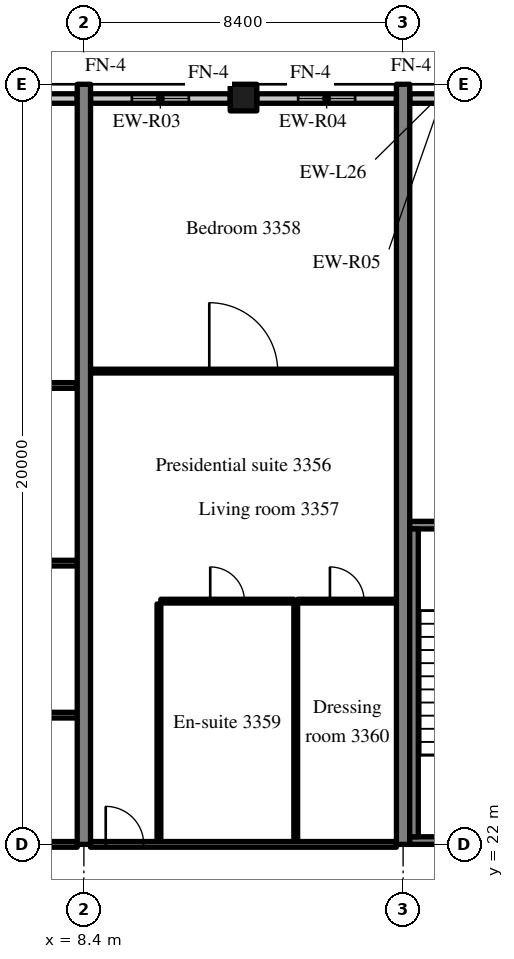
"""IFC4 building model, lengths in metres.
Left out: names, types, materials, properties, quantities, classifications, styles, units other than length and angle.
Written with IfcOpenShell. Run it as: python <this file> out.ifc"""

import sys

from ifc_helpers import new_model, si_unit, direction, frame, frame_2d, origin, origin_2d, place, context, subcontext, project, spatial, rectangle, extrude, source, transform, mapped, element, fill, save


model = new_model("IFC4")
c1 = context("Model", 3, precision=1e-05, world=origin(), true_north=direction((0.0, 1.0)))
c2 = subcontext(c1, "Body", "Model", "MODEL_VIEW")
j1 = project(units=[si_unit("LENGTHUNIT", "METRE"), si_unit("PLANEANGLEUNIT", "RADIAN")], contexts=[c1])
p1 = place(None, origin())
s1 = spatial("IfcSite", under=j1, at=p1, CompositionType="ELEMENT")
p2 = place(p1, origin())
s2 = spatial("IfcBuilding", under=s1, at=p2, CompositionType="ELEMENT")
p3 = place(p2, frame((0.0, 0.0, 137.0)))
s3 = spatial("IfcBuildingStorey", under=s2, at=p3, CompositionType="ELEMENT", Elevation=137.0)
m1 = source(origin(), c2, "Body", "SweptSolid", [
    extrude(rectangle(XDim=20.0, YDim=0.35, at=frame_2d((10.0, 0.0))), origin(), (0.0, 0.0, 1.0), 3.52),
])
for number, where, z_axis, x_axis in (
    (1, (8.4, 22.0, 0.0), (0.0, 0.0, 1.0), (0.0, 1.0, 0.0)),
    (2, (16.8, 22.0, 0.0), (0.0, 0.0, 1.0), (0.0, 1.0, 0.0)),
):
    element("IfcWall", number, at=place(p3, frame(where, z_axis=z_axis, x_axis=x_axis)), inside=s3, PredefinedType="SHEAR", context=c2, shape_type="MappedRepresentation", body=[
        mapped(m1, transform((0.0, 0.0, 0.0), scale=1.0)),
    ])
m2 = source(origin(), c2, "Body", "SweptSolid", [
    extrude(rectangle(XDim=0.7, YDim=0.7, at=origin_2d()), origin(), (0.0, 0.0, 1.0), 3.52),
])
p4 = place(p3, frame((12.6, 41.65, 0.0), z_axis=(0.0, 0.0, 1.0), x_axis=(1.0, 0.0, 0.0)))
e3 = element("IfcColumn", 3, at=p4, inside=s3, PredefinedType="COLUMN", context=c2, shape_type="MappedRepresentation", body=[
    mapped(m2, transform((0.0, 0.0, 0.0), scale=1.0)),
])
m3 = source(origin(), c2, "Body", "SweptSolid", [
    extrude(rectangle(XDim=4.07, YDim=0.25, at=frame_2d((2.035, 0.0))), origin(), (0.0, 0.0, 1.0), 2.82),
])
p5 = place(p3, frame((8.225, 41.625, 0.0), z_axis=(0.0, 0.0, 1.0), x_axis=(-1.0, 0.0, 0.0)))
e4 = element("IfcWall", 4, at=p5, inside=s3, PredefinedType="SOLIDWALL", context=c2, shape_type="MappedRepresentation", body=[
    mapped(m3, transform((0.0, 0.0, 0.0), scale=1.0)),
])
m4 = source(origin(), c2, "Body", "SweptSolid", [
    extrude(rectangle(XDim=1.5, YDim=1.5, at=frame_2d((0.75, 0.75))), frame((0.0, 0.135, 0.0), z_axis=(0.0, -1.0, 0.0), x_axis=(1.0, 0.0, 0.0)), (0.0, 0.0, 1.0), 0.27),
])
p6 = place(p5, frame((1.285, 0.0, 0.9)))
e5 = element("IfcOpeningElement", 5, at=p6, cuts=e4, PredefinedType="OPENING", context=c2, shape_type="MappedRepresentation", body=[
    mapped(m4, transform((0.0, 0.0, 0.0), scale=1.0)),
])
m5 = source(origin(), c2, "Body", "SweptSolid", [
    extrude(rectangle(XDim=3.675, YDim=0.25, at=frame_2d((1.837, 0.0))), origin(), (0.0, 0.0, 1.0), 2.82),
])
p7 = place(p3, frame((12.25, 41.625, 0.0), z_axis=(0.0, 0.0, 1.0), x_axis=(-1.0, 0.0, 0.0)))
e6 = element("IfcWall", 6, at=p7, inside=s3, PredefinedType="SOLIDWALL", context=c2, shape_type="MappedRepresentation", body=[
    mapped(m5, transform((0.0, 0.0, 0.0), scale=1.0)),
])
p8 = place(p7, frame((1.087, 0.0, 0.9)))
e7 = element("IfcOpeningElement", 7, at=p8, cuts=e6, PredefinedType="OPENING", context=c2, shape_type="MappedRepresentation", body=[
    mapped(m4, transform((0.0, 0.0, 0.0), scale=1.0)),
])
p9 = place(p3, frame((16.625, 41.625, 0.0), z_axis=(0.0, 0.0, 1.0), x_axis=(-1.0, 0.0, 0.0)))
e8 = element("IfcWall", 8, at=p9, inside=s3, PredefinedType="SOLIDWALL", context=c2, shape_type="MappedRepresentation", body=[
    mapped(m5, transform((0.0, 0.0, 0.0), scale=1.0)),
])
p10 = place(p9, frame((1.087, 0.0, 0.9)))
e9 = element("IfcOpeningElement", 9, at=p10, cuts=e8, PredefinedType="OPENING", context=c2, shape_type="MappedRepresentation", body=[
    mapped(m4, transform((0.0, 0.0, 0.0), scale=1.0)),
])
m6 = source(origin(), c2, "Body", "SweptSolid", [
    extrude(rectangle(XDim=1.683, YDim=0.25, at=frame_2d((0.841, 0.0))), origin(), (0.0, 0.0, 1.0), 2.82),
])
p11 = place(p3, frame((18.658, 41.625, 0.0), z_axis=(0.0, 0.0, 1.0), x_axis=(-1.0, 0.0, 0.0)))
e10 = element("IfcWall", 10, at=p11, inside=s3, PredefinedType="SOLIDWALL", context=c2, shape_type="MappedRepresentation", body=[
    mapped(m6, transform((0.0, 0.0, 0.0), scale=1.0)),
])
m7 = source(origin(), c2, "Body", "SweptSolid", [
    extrude(rectangle(XDim=8.225, YDim=0.2, at=frame_2d((4.112, 0.0))), origin(), (0.0, 0.0, 1.0), 3.52),
])
p12 = place(p3, frame((16.975, 22.1, 0.0), z_axis=(0.0, 0.0, 1.0), x_axis=(1.0, 0.0, 0.0)))
e11 = element("IfcWall", 11, at=p12, inside=s3, PredefinedType="SOLIDWALL", context=c2, shape_type="MappedRepresentation", body=[
    mapped(m7, transform((0.0, 0.0, 0.0), scale=1.0)),
])
m8 = source(origin(), c2, "Body", "SweptSolid", [
    extrude(rectangle(XDim=1.2, YDim=2.1, at=frame_2d((0.6, 1.05))), frame((0.0, 0.11, 0.0), z_axis=(0.0, -1.0, 0.0), x_axis=(1.0, 0.0, 0.0)), (0.0, 0.0, 1.0), 0.22),
])
p13 = place(p12, frame((6.025, 0.0, 0.0)))
e12 = element("IfcOpeningElement", 12, at=p13, cuts=e11, PredefinedType="OPENING", context=c2, shape_type="MappedRepresentation", body=[
    mapped(m8, transform((0.0, 0.0, 0.0), scale=1.0)),
])
p14 = place(p3, frame((16.975, 30.4, 0.0), z_axis=(0.0, 0.0, 1.0), x_axis=(1.0, 0.0, 0.0)))
e13 = element("IfcWall", 13, at=p14, inside=s3, PredefinedType="SOLIDWALL", context=c2, shape_type="MappedRepresentation", body=[
    mapped(m7, transform((0.0, 0.0, 0.0), scale=1.0)),
])
m9 = source(origin(), c2, "Body", "SweptSolid", [
    extrude(rectangle(XDim=1.0, YDim=2.1, at=frame_2d((0.5, 1.05))), frame((0.0, 0.11, 0.0), z_axis=(0.0, -1.0, 0.0), x_axis=(1.0, 0.0, 0.0)), (0.0, 0.0, 1.0), 0.22),
])
p15 = place(p14, frame((6.125, 0.0, 0.0)))
e14 = element("IfcOpeningElement", 14, at=p15, cuts=e13, PredefinedType="OPENING", context=c2, shape_type="MappedRepresentation", body=[
    mapped(m9, transform((0.0, 0.0, 0.0), scale=1.0)),
])
m10 = source(origin(), c2, "Body", "SweptSolid", [
    extrude(rectangle(XDim=8.1, YDim=0.225, at=frame_2d((4.05, 0.0))), origin(), (0.0, 0.0, 1.0), 3.52),
])
p16 = place(p3, frame((17.087, 22.2, 0.0), z_axis=(0.0, 0.0, 1.0), x_axis=(0.0, 1.0, 0.0)))
e15 = element("IfcWall", 15, at=p16, inside=s3, PredefinedType="SOLIDWALL", context=c2, shape_type="MappedRepresentation", body=[
    mapped(m10, transform((0.0, 0.0, 0.0), scale=1.0)),
])
m11 = source(origin(), c2, "Body", "SweptSolid", [
    extrude(rectangle(XDim=5.325, YDim=0.15, at=frame_2d((2.663, 0.0))), origin(), (0.0, 0.0, 1.0), 2.82),
])
p17 = place(p3, frame((2.9, 22.0, 0.0), z_axis=(0.0, 0.0, 1.0), x_axis=(1.0, 0.0, 0.0)))
e16 = element("IfcWall", 16, at=p17, inside=s3, PredefinedType="PARTITIONING", context=c2, shape_type="MappedRepresentation", body=[
    mapped(m11, transform((0.0, 0.0, 0.0), scale=1.0)),
])
m12 = source(origin(), c2, "Body", "SweptSolid", [
    extrude(rectangle(XDim=5.325, YDim=0.15, at=frame_2d((2.663, 0.0))), origin(), (0.0, 0.0, 1.0), 3.52),
])
for number, where, z_axis, x_axis in (
    (17, (2.9, 25.4, 0.0), (0.0, 0.0, 1.0), (1.0, 0.0, 0.0)),
    (18, (2.9, 29.4, 0.0), (0.0, 0.0, 1.0), (1.0, 0.0, 0.0)),
):
    element("IfcWall", number, at=place(p3, frame(where, z_axis=z_axis, x_axis=x_axis)), inside=s3, PredefinedType="PARTITIONING", context=c2, shape_type="MappedRepresentation", body=[
        mapped(m12, transform((0.0, 0.0, 0.0), scale=1.0)),
    ])
m13 = source(origin(), c2, "Body", "SweptSolid", [
    extrude(rectangle(XDim=7.875, YDim=0.15, at=frame_2d((3.938, 0.0))), origin(), (0.0, 0.0, 1.0), 3.52),
])
p18 = place(p3, frame((0.35, 34.075, 0.0), z_axis=(0.0, 0.0, 1.0), x_axis=(1.0, 0.0, 0.0)))
e19 = element("IfcWall", 19, at=p18, inside=s3, PredefinedType="PARTITIONING", context=c2, shape_type="MappedRepresentation", body=[
    mapped(m13, transform((0.0, 0.0, 0.0), scale=1.0)),
])
m14 = source(origin(), c2, "Body", "SweptSolid", [
    extrude(rectangle(XDim=1.0, YDim=2.1, at=frame_2d((0.5, 1.05))), frame((0.0, 0.085, 0.0), z_axis=(0.0, -1.0, 0.0), x_axis=(1.0, 0.0, 0.0)), (0.0, 0.0, 1.0), 0.17),
])
p19 = place(p18, frame((0.7, 0.0, 0.0)))
e20 = element("IfcOpeningElement", 20, at=p19, cuts=e19, PredefinedType="OPENING", context=c2, shape_type="MappedRepresentation", body=[
    mapped(m14, transform((0.0, 0.0, 0.0), scale=1.0)),
])
m15 = source(origin(), c2, "Body", "SweptSolid", [
    extrude(rectangle(XDim=6.25, YDim=0.1, at=frame_2d((3.125, 0.0))), origin(), (0.0, 0.0, 1.0), 3.52),
])
for number, where, z_axis, x_axis in (
    (21, (10.375, 22.075, 0.0), (0.0, 0.0, 1.0), (0.0, 1.0, 0.0)),
    (22, (13.975, 22.075, 0.0), (0.0, 0.0, 1.0), (0.0, 1.0, 0.0)),
):
    element("IfcWall", number, at=place(p3, frame(where, z_axis=z_axis, x_axis=x_axis)), inside=s3, PredefinedType="PARTITIONING", context=c2, shape_type="MappedRepresentation", body=[
        mapped(m15, transform((0.0, 0.0, 0.0), scale=1.0)),
    ])
m16 = source(origin(), c2, "Body", "SweptSolid", [
    extrude(rectangle(XDim=3.5, YDim=0.1, at=frame_2d((1.75, 0.0))), origin(), (0.0, 0.0, 1.0), 3.52),
])
p20 = place(p3, frame((10.425, 28.4, 0.0), z_axis=(0.0, 0.0, 1.0), x_axis=(1.0, 0.0, 0.0)))
e23 = element("IfcWall", 23, at=p20, inside=s3, PredefinedType="PARTITIONING", context=c2, shape_type="MappedRepresentation", body=[
    mapped(m16, transform((0.0, 0.0, 0.0), scale=1.0)),
])
m17 = source(origin(), c2, "Body", "SweptSolid", [
    extrude(rectangle(XDim=0.9, YDim=2.1, at=frame_2d((0.45, 1.05))), frame((0.0, 0.06, 0.0), z_axis=(0.0, -1.0, 0.0), x_axis=(1.0, 0.0, 0.0)), (0.0, 0.0, 1.0), 0.12),
])
p21 = place(p20, frame((1.3, 0.0, 0.0)))
e24 = element("IfcOpeningElement", 24, at=p21, cuts=e23, PredefinedType="OPENING", context=c2, shape_type="MappedRepresentation", body=[
    mapped(m17, transform((0.0, 0.0, 0.0), scale=1.0)),
])
m18 = source(origin(), c2, "Body", "SweptSolid", [
    extrude(rectangle(XDim=2.6, YDim=0.1, at=frame_2d((1.3, 0.0))), origin(), (0.0, 0.0, 1.0), 3.52),
])
p22 = place(p3, frame((14.025, 28.4, 0.0), z_axis=(0.0, 0.0, 1.0), x_axis=(1.0, 0.0, 0.0)))
e25 = element("IfcWall", 25, at=p22, inside=s3, PredefinedType="PARTITIONING", context=c2, shape_type="MappedRepresentation", body=[
    mapped(m18, transform((0.0, 0.0, 0.0), scale=1.0)),
])
p23 = place(p22, frame((0.85, 0.0, 0.0)))
e26 = element("IfcOpeningElement", 26, at=p23, cuts=e25, PredefinedType="OPENING", context=c2, shape_type="MappedRepresentation", body=[
    mapped(m17, transform((0.0, 0.0, 0.0), scale=1.0)),
])
m19 = source(origin(), c2, "Body", "SweptSolid", [
    extrude(rectangle(XDim=8.05, YDim=0.1, at=frame_2d((4.025, 0.0))), origin(), (0.0, 0.0, 1.0), 3.52),
])
p24 = place(p3, frame((8.575, 34.453, 0.0), z_axis=(0.0, 0.0, 1.0), x_axis=(1.0, 0.0, 0.0)))
e27 = element("IfcWall", 27, at=p24, inside=s3, PredefinedType="PARTITIONING", context=c2, shape_type="MappedRepresentation", body=[
    mapped(m19, transform((0.0, 0.0, 0.0), scale=1.0)),
])
m20 = source(origin(), c2, "Body", "SweptSolid", [
    extrude(rectangle(XDim=1.8, YDim=2.1, at=frame_2d((0.9, 1.05))), frame((0.0, 0.06, 0.0), z_axis=(0.0, -1.0, 0.0), x_axis=(1.0, 0.0, 0.0)), (0.0, 0.0, 1.0), 0.12),
])
p25 = place(p24, frame((3.125, 0.0, 0.0)))
e28 = element("IfcOpeningElement", 28, at=p25, cuts=e27, PredefinedType="OPENING", context=c2, shape_type="MappedRepresentation", body=[
    mapped(m20, transform((0.0, 0.0, 0.0), scale=1.0)),
])
m21 = source(origin(), c2, "Body", "SweptSolid", [
    extrude(rectangle(XDim=8.05, YDim=0.15, at=frame_2d((4.025, 0.0))), origin(), (0.0, 0.0, 1.0), 2.82),
])
p26 = place(p3, frame((8.575, 22.0, 0.0), z_axis=(0.0, 0.0, 1.0), x_axis=(1.0, 0.0, 0.0)))
e29 = element("IfcWall", 29, at=p26, inside=s3, PredefinedType="PARTITIONING", context=c2, shape_type="MappedRepresentation", body=[
    mapped(m21, transform((0.0, 0.0, 0.0), scale=1.0)),
])
p27 = place(p26, frame((0.4, 0.0, 0.0)))
e30 = element("IfcOpeningElement", 30, at=p27, cuts=e29, PredefinedType="OPENING", context=c2, shape_type="MappedRepresentation", body=[
    mapped(m14, transform((0.0, 0.0, 0.0), scale=1.0)),
])
m22 = source(origin(), c2, "Body", "SweptSolid", [
    extrude(rectangle(XDim=1.5, YDim=1.5, at=frame_2d((0.75, 0.75))), frame((0.0, 0.03, 0.0), z_axis=(0.0, -1.0, 0.0), x_axis=(1.0, 0.0, 0.0)), (0.0, 0.0, 1.0), 0.06),
])
p28 = place(p8, origin())
e31 = element("IfcWindow", 31, at=p28, inside=s3, PartitioningType="SINGLE_PANEL", PredefinedType="WINDOW", context=c2, shape_type="MappedRepresentation", body=[
    mapped(m22, transform((0.0, 0.0, 0.0), scale=1.0)),
])
fill(e7, e31)
p29 = place(p10, origin())
e32 = element("IfcWindow", 32, at=p29, inside=s3, PartitioningType="SINGLE_PANEL", PredefinedType="WINDOW", context=c2, shape_type="MappedRepresentation", body=[
    mapped(m22, transform((0.0, 0.0, 0.0), scale=1.0)),
])
fill(e9, e32)
m23 = source(origin(), c2, "Body", "SweptSolid", [
    extrude(rectangle(XDim=0.9, YDim=2.1, at=frame_2d((0.45, 1.05))), frame((0.0, 0.025, 0.0), z_axis=(0.0, -1.0, 0.0), x_axis=(1.0, 0.0, 0.0)), (0.0, 0.0, 1.0), 0.05),
])
p30 = place(p21, origin())
e33 = element("IfcDoor", 33, at=p30, inside=s3, OperationType="SINGLE_SWING_LEFT", PredefinedType="DOOR", context=c2, shape_type="MappedRepresentation", body=[
    mapped(m23, transform((0.0, 0.0, 0.0), scale=1.0)),
])
fill(e24, e33)
p31 = place(p23, origin())
e34 = element("IfcDoor", 34, at=p31, inside=s3, OperationType="SINGLE_SWING_LEFT", PredefinedType="DOOR", context=c2, shape_type="MappedRepresentation", body=[
    mapped(m23, transform((0.0, 0.0, 0.0), scale=1.0)),
])
fill(e26, e34)
m24 = source(origin(), c2, "Body", "SweptSolid", [
    extrude(rectangle(XDim=1.8, YDim=2.1, at=frame_2d((0.9, 1.05))), frame((0.0, 0.025, 0.0), z_axis=(0.0, -1.0, 0.0), x_axis=(1.0, 0.0, 0.0)), (0.0, 0.0, 1.0), 0.05),
])
p32 = place(p25, origin())
e35 = element("IfcDoor", 35, at=p32, inside=s3, OperationType="DOUBLE_DOOR_SINGLE_SWING", PredefinedType="DOOR", context=c2, shape_type="MappedRepresentation", body=[
    mapped(m24, transform((0.0, 0.0, 0.0), scale=1.0)),
])
fill(e28, e35)
m25 = source(origin(), c2, "Body", "SweptSolid", [
    extrude(rectangle(XDim=1.0, YDim=2.1, at=frame_2d((0.5, 1.05))), frame((0.0, 0.025, 0.0), z_axis=(0.0, -1.0, 0.0), x_axis=(1.0, 0.0, 0.0)), (0.0, 0.0, 1.0), 0.05),
])
p33 = place(p27, origin())
e36 = element("IfcDoor", 36, at=p33, inside=s3, OperationType="SINGLE_SWING_LEFT", PredefinedType="DOOR", context=c2, shape_type="MappedRepresentation", body=[
    mapped(m25, transform((0.0, 0.0, 0.0), scale=1.0)),
])
fill(e30, e36)
save(model, sys.argv[1])
